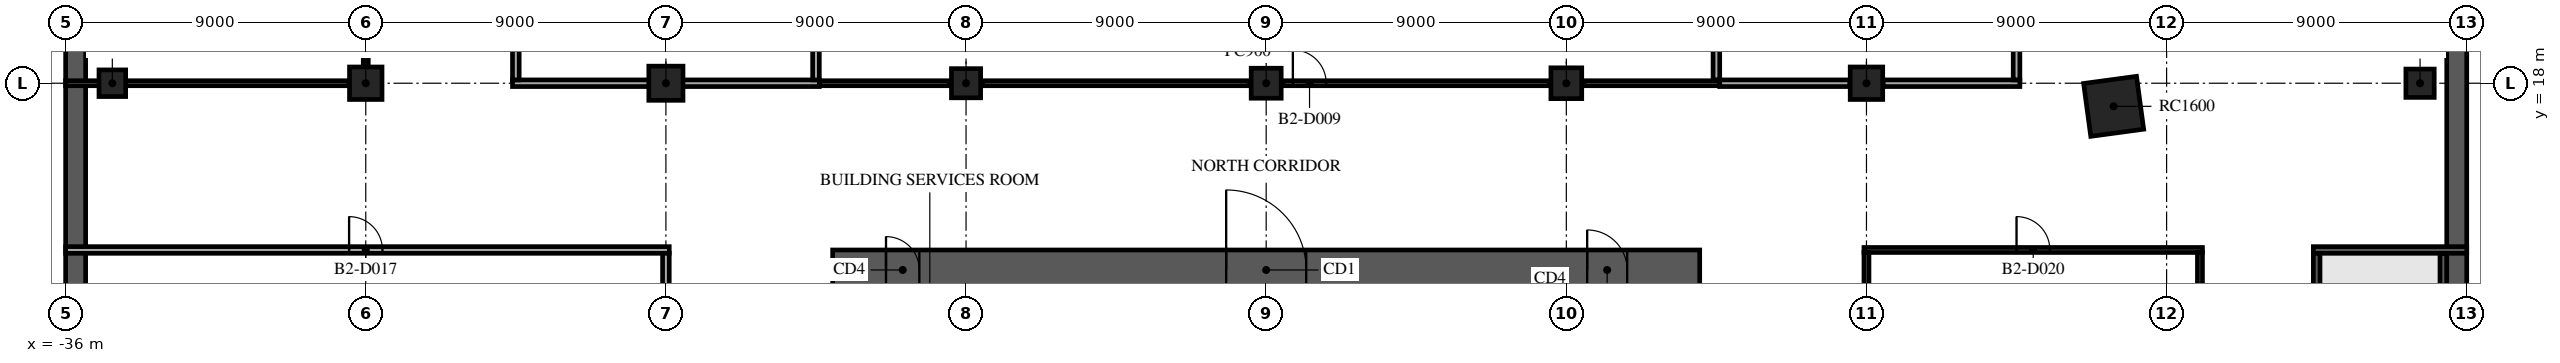
"""IFC4 building model, lengths in metres.
Left out: names, types, materials, properties, quantities, classifications, styles, units other than length and angle.
Written with IfcOpenShell. Run it as: python <this file> out.ifc"""

import sys

from ifc_helpers import new_model, si_unit, direction, frame, frame_2d, origin, origin_2d, place, context, subcontext, project, spatial, rectangle, extrude, element, fill, save


model = new_model("IFC4")
c1 = context("Model", 3, precision=1e-05, world=origin(), true_north=direction((0.0, 1.0)))
c2 = subcontext(c1, "Body", "Model", "MODEL_VIEW")
j1 = project(units=[si_unit("LENGTHUNIT", "METRE"), si_unit("PLANEANGLEUNIT", "RADIAN")], contexts=[c1])
p1 = place(None, origin())
s1 = spatial("IfcSite", under=j1, at=p1, CompositionType="ELEMENT")
p2 = place(p1, origin())
s2 = spatial("IfcBuilding", under=s1, at=p2, CompositionType="ELEMENT")
p3 = place(p2, frame((0.0, 0.0, -9.0)))
s3 = spatial("IfcBuildingStorey", under=s2, at=p3, CompositionType="ELEMENT", Elevation=-9.0)
for number, where, z_axis, x_axis in (
    (1, (35.7, -31.0, -0.3), (0.0, 0.0, 1.0), (0.0, 1.0, 0.0)),
    (2, (-35.7, 31.0, -0.3), (0.0, 0.0, 1.0), (0.0, -1.0, 0.0)),
):
    element("IfcWall", number, at=place(p3, frame(where, z_axis=z_axis, x_axis=x_axis)), inside=s3, PredefinedType="SOLIDWALL", context=c2, shape_type="SweptSolid", body=[
        extrude(rectangle(XDim=62.0, YDim=0.6, at=frame_2d((31.0, 0.0))), origin(), (0.0, 0.0, 1.0), 4.5),
    ])
p4 = place(p3, frame((-34.6, 18.0, -0.3), z_axis=(0.0, 0.0, 1.0), x_axis=(1.0, 0.0, 0.0)))
e3 = element("IfcColumn", 3, at=p4, inside=s3, PredefinedType="COLUMN", context=c2, shape_type="SweptSolid", body=[
    extrude(rectangle(XDim=0.8, YDim=0.8, at=origin_2d()), origin(), (0.0, 0.0, 1.0), 4.8),
])
p5 = place(p3, frame((-27.0, 18.0, -0.3), z_axis=(0.0, 0.0, 1.0), x_axis=(1.0, 0.0, 0.0)))
e4 = element("IfcColumn", 4, at=p5, inside=s3, PredefinedType="COLUMN", context=c2, shape_type="SweptSolid", body=[
    extrude(rectangle(XDim=0.975, YDim=0.975, at=origin_2d()), origin(), (0.0, 0.0, 1.0), 4.8),
])
p6 = place(p3, frame((-18.0, 18.0, -0.3), z_axis=(0.0, 0.0, 1.0), x_axis=(1.0, 0.0, 0.0)))
e5 = element("IfcColumn", 5, at=p6, inside=s3, PredefinedType="COLUMN", context=c2, shape_type="SweptSolid", body=[
    extrude(rectangle(XDim=1.025, YDim=1.025, at=origin_2d()), origin(), (0.0, 0.0, 1.0), 4.8),
])
p7 = place(p3, frame((-9.0, 18.0, -0.3), z_axis=(0.0, 0.0, 1.0), x_axis=(1.0, 0.0, 0.0)))
e6 = element("IfcColumn", 6, at=p7, inside=s3, PredefinedType="COLUMN", context=c2, shape_type="SweptSolid", body=[
    extrude(rectangle(XDim=0.875, YDim=0.875, at=origin_2d()), origin(), (0.0, 0.0, 1.0), 4.8),
])
p8 = place(p3, frame((0.0, 18.0, -0.3), z_axis=(0.0, 0.0, 1.0), x_axis=(1.0, 0.0, 0.0)))
e7 = element("IfcColumn", 7, at=p8, inside=s3, PredefinedType="COLUMN", context=c2, shape_type="SweptSolid", body=[
    extrude(rectangle(XDim=0.9, YDim=0.9, at=origin_2d()), origin(), (0.0, 0.0, 1.0), 4.8),
])
p9 = place(p3, frame((9.0, 18.0, -0.3), z_axis=(0.0, 0.0, 1.0), x_axis=(1.0, 0.0, 0.0)))
e8 = element("IfcColumn", 8, at=p9, inside=s3, PredefinedType="COLUMN", context=c2, shape_type="SweptSolid", body=[
    extrude(rectangle(XDim=0.925, YDim=0.925, at=origin_2d()), origin(), (0.0, 0.0, 1.0), 4.8),
])
p10 = place(p3, frame((18.0, 18.0, -0.3), z_axis=(0.0, 0.0, 1.0), x_axis=(1.0, 0.0, 0.0)))
e9 = element("IfcColumn", 9, at=p10, inside=s3, PredefinedType="COLUMN", context=c2, shape_type="SweptSolid", body=[
    extrude(rectangle(XDim=0.975, YDim=0.975, at=origin_2d()), origin(), (0.0, 0.0, 1.0), 4.8),
])
p11 = place(p3, frame((34.6, 18.0, -0.3), z_axis=(0.0, 0.0, 1.0), x_axis=(1.0, 0.0, 0.0)))
e10 = element("IfcColumn", 10, at=p11, inside=s3, PredefinedType="COLUMN", context=c2, shape_type="SweptSolid", body=[
    extrude(rectangle(XDim=0.85, YDim=0.85, at=origin_2d()), origin(), (0.0, 0.0, 1.0), 4.8),
])
p12 = place(p3, frame((25.412, 17.307, -0.3), z_axis=(0.0, 0.0, 1.0), x_axis=(0.991001197216, 0.133853005627, 0.0)))
e11 = element("IfcColumn", 11, at=p12, inside=s3, PredefinedType="COLUMN", context=c2, shape_type="SweptSolid", body=[
    extrude(rectangle(XDim=1.6, YDim=1.6, at=origin_2d()), origin(), (0.0, 0.0, 1.0), 4.8),
])
p13 = place(p3, frame((-13.0, 12.4, 0.0), z_axis=(0.0, 0.0, 1.0), x_axis=(1.0, 0.0, 0.0)))
e12 = element("IfcWall", 12, at=p13, inside=s3, PredefinedType="SHEAR", context=c2, shape_type="SweptSolid", body=[
    extrude(rectangle(XDim=26.0, YDim=1.2, at=frame_2d((13.0, 0.0))), origin(), (0.0, 0.0, 1.0), 4.2),
])
p14 = place(p13, frame((11.8, 0.0, 0.0)))
e13 = element("IfcOpeningElement", 13, at=p14, cuts=e12, PredefinedType="OPENING", context=c2, shape_type="SweptSolid", body=[
    extrude(rectangle(XDim=2.4, YDim=2.4, at=frame_2d((1.2, 1.2))), frame((0.0, 0.61, 0.0), z_axis=(0.0, -1.0, 0.0), x_axis=(1.0, 0.0, 0.0)), (0.0, 0.0, 1.0), 1.22),
])
p15 = place(p13, frame((22.625, 0.0, 0.0)))
e14 = element("IfcOpeningElement", 14, at=p15, cuts=e12, PredefinedType="OPENING", context=c2, shape_type="SweptSolid", body=[
    extrude(rectangle(XDim=1.2, YDim=2.1, at=frame_2d((0.6, 1.05))), frame((0.0, 0.61, 0.0), z_axis=(0.0, -1.0, 0.0), x_axis=(1.0, 0.0, 0.0)), (0.0, 0.0, 1.0), 1.22),
])
p16 = place(p13, frame((1.6, 0.0, 0.0)))
e15 = element("IfcOpeningElement", 15, at=p16, cuts=e12, PredefinedType="OPENING", context=c2, shape_type="SweptSolid", body=[
    extrude(rectangle(XDim=1.0, YDim=2.1, at=frame_2d((0.5, 1.05))), frame((0.0, 0.61, 0.0), z_axis=(0.0, -1.0, 0.0), x_axis=(1.0, 0.0, 0.0)), (0.0, 0.0, 1.0), 1.22),
])
p17 = place(p3, frame((-36.0, 13.0, 0.0), z_axis=(0.0, 0.0, 1.0), x_axis=(1.0, 0.0, 0.0)))
e16 = element("IfcWall", 16, at=p17, inside=s3, PredefinedType="PARTITIONING", context=c2, shape_type="SweptSolid", body=[
    extrude(rectangle(XDim=18.1, YDim=0.2, at=frame_2d((9.05, 0.0))), origin(), (0.0, 0.0, 1.0), 4.2),
])
p18 = place(p17, frame((8.5, 0.0, 0.0)))
e17 = element("IfcOpeningElement", 17, at=p18, cuts=e16, PredefinedType="OPENING", context=c2, shape_type="SweptSolid", body=[
    extrude(rectangle(XDim=1.0, YDim=2.1, at=frame_2d((0.5, 1.05))), frame((0.0, 0.11, 0.0), z_axis=(0.0, -1.0, 0.0), x_axis=(1.0, 0.0, 0.0)), (0.0, 0.0, 1.0), 0.22),
])
p19 = place(p3, frame((17.925, 13.0, 0.0), z_axis=(0.0, 0.0, 1.0), x_axis=(1.0, 0.0, 0.0)))
e18 = element("IfcWall", 18, at=p19, inside=s3, PredefinedType="PARTITIONING", context=c2, shape_type="SweptSolid", body=[
    extrude(rectangle(XDim=10.15, YDim=0.15, at=frame_2d((5.075, 0.0))), origin(), (0.0, 0.0, 1.0), 4.2),
])
p20 = place(p19, frame((4.575, 0.0, 0.0)))
e19 = element("IfcOpeningElement", 19, at=p20, cuts=e18, PredefinedType="OPENING", context=c2, shape_type="SweptSolid", body=[
    extrude(rectangle(XDim=1.0, YDim=2.1, at=frame_2d((0.5, 1.05))), frame((0.0, 0.085, 0.0), z_axis=(0.0, -1.0, 0.0), x_axis=(1.0, 0.0, 0.0)), (0.0, 0.0, 1.0), 0.17),
])
p21 = place(p3, frame((31.4, 13.0, 0.0), z_axis=(0.0, 0.0, 1.0), x_axis=(1.0, 0.0, 0.0)))
e20 = element("IfcWall", 20, at=p21, inside=s3, PredefinedType="PARTITIONING", context=c2, shape_type="SweptSolid", body=[
    extrude(rectangle(XDim=4.6, YDim=0.2, at=frame_2d((2.3, 0.0))), origin(), (0.0, 0.0, 1.0), 4.2),
])
p22 = place(p3, frame((-36.0, 18.0, 0.0), z_axis=(0.0, 0.0, 1.0), x_axis=(1.0, 0.0, 0.0)))
e21 = element("IfcWall", 21, at=p22, inside=s3, PredefinedType="PARTITIONING", context=c2, shape_type="SweptSolid", body=[
    extrude(rectangle(XDim=8.5, YDim=0.15, at=frame_2d((4.25, 0.0))), origin(), (0.0, 0.0, 1.0), 4.2),
])
for number, where, z_axis, x_axis in (
    (22, (-22.6, 18.0, 0.0), (0.0, 0.0, 1.0), (1.0, 0.0, 0.0)),
    (23, (-17.5, 18.0, 0.0), (0.0, 0.0, 1.0), (1.0, 0.0, 0.0)),
):
    element("IfcWall", number, at=place(p3, frame(where, z_axis=z_axis, x_axis=x_axis)), inside=s3, PredefinedType="PARTITIONING", context=c2, shape_type="SweptSolid", body=[
        extrude(rectangle(XDim=4.1, YDim=0.2, at=frame_2d((2.05, 0.0))), origin(), (0.0, 0.0, 1.0), 4.2),
    ])
p23 = place(p3, frame((-13.4, 18.0, 0.0), z_axis=(0.0, 0.0, 1.0), x_axis=(1.0, 0.0, 0.0)))
e24 = element("IfcWall", 24, at=p23, inside=s3, PredefinedType="PARTITIONING", context=c2, shape_type="SweptSolid", body=[
    extrude(rectangle(XDim=3.9, YDim=0.15, at=frame_2d((1.95, 0.0))), origin(), (0.0, 0.0, 1.0), 4.2),
])
p24 = place(p3, frame((-8.5, 18.0, 0.0), z_axis=(0.0, 0.0, 1.0), x_axis=(1.0, 0.0, 0.0)))
e25 = element("IfcWall", 25, at=p24, inside=s3, PredefinedType="PARTITIONING", context=c2, shape_type="SweptSolid", body=[
    extrude(rectangle(XDim=8.0, YDim=0.15, at=frame_2d((4.0, 0.0))), origin(), (0.0, 0.0, 1.0), 4.2),
])
p25 = place(p3, frame((0.5, 18.0, 0.0), z_axis=(0.0, 0.0, 1.0), x_axis=(1.0, 0.0, 0.0)))
e26 = element("IfcWall", 26, at=p25, inside=s3, PredefinedType="PARTITIONING", context=c2, shape_type="SweptSolid", body=[
    extrude(rectangle(XDim=8.0, YDim=0.15, at=frame_2d((4.0, 0.0))), origin(), (0.0, 0.0, 1.0), 4.2),
])
p26 = place(p25, frame((0.3, 0.0, 0.0)))
e27 = element("IfcOpeningElement", 27, at=p26, cuts=e26, PredefinedType="OPENING", context=c2, shape_type="SweptSolid", body=[
    extrude(rectangle(XDim=1.0, YDim=2.1, at=frame_2d((0.5, 1.05))), frame((0.0, 0.085, 0.0), z_axis=(0.0, -1.0, 0.0), x_axis=(1.0, 0.0, 0.0)), (0.0, 0.0, 1.0), 0.17),
])
p27 = place(p3, frame((9.5, 18.0, 0.0), z_axis=(0.0, 0.0, 1.0), x_axis=(1.0, 0.0, 0.0)))
e28 = element("IfcWall", 28, at=p27, inside=s3, PredefinedType="PARTITIONING", context=c2, shape_type="SweptSolid", body=[
    extrude(rectangle(XDim=4.1, YDim=0.15, at=frame_2d((2.05, 0.0))), origin(), (0.0, 0.0, 1.0), 4.2),
])
p28 = place(p3, frame((13.6, 18.0, 0.0), z_axis=(0.0, 0.0, 1.0), x_axis=(1.0, 0.0, 0.0)))
e29 = element("IfcWall", 29, at=p28, inside=s3, PredefinedType="PARTITIONING", context=c2, shape_type="SweptSolid", body=[
    extrude(rectangle(XDim=3.9, YDim=0.2, at=frame_2d((1.95, 0.0))), origin(), (0.0, 0.0, 1.0), 4.2),
])
p29 = place(p3, frame((18.5, 18.0, 0.0), z_axis=(0.0, 0.0, 1.0), x_axis=(1.0, 0.0, 0.0)))
e30 = element("IfcWall", 30, at=p29, inside=s3, PredefinedType="PARTITIONING", context=c2, shape_type="SweptSolid", body=[
    extrude(rectangle(XDim=4.1, YDim=0.2, at=frame_2d((2.05, 0.0))), origin(), (0.0, 0.0, 1.0), 4.2),
])
p30 = place(p3, frame((-27.0, 18.5, 0.0), z_axis=(0.0, 0.0, 1.0), x_axis=(0.0, 1.0, 0.0)))
e31 = element("IfcWall", 31, at=p30, inside=s3, PredefinedType="PARTITIONING", context=c2, shape_type="SweptSolid", body=[
    extrude(rectangle(XDim=1.242, YDim=0.15, at=frame_2d((0.621, 0.0))), origin(), (0.0, 0.0, 1.0), 4.2),
])
p31 = place(p3, frame((-22.5, 18.1, 0.0), z_axis=(0.0, 0.0, 1.0), x_axis=(0.0, 1.0, 0.0)))
e32 = element("IfcWall", 32, at=p31, inside=s3, PredefinedType="PARTITIONING", context=c2, shape_type="SweptSolid", body=[
    extrude(rectangle(XDim=13.3, YDim=0.2, at=frame_2d((6.65, 0.0))), origin(), (0.0, 0.0, 1.0), 4.2),
])
p32 = place(p31, frame((6.1, 0.0, 0.0)))
e33 = element("IfcOpeningElement", 33, at=p32, cuts=e32, PredefinedType="OPENING", context=c2, shape_type="SweptSolid", body=[
    extrude(rectangle(XDim=1.0, YDim=2.1, at=frame_2d((0.5, 1.05))), frame((0.0, 0.11, 0.0), z_axis=(0.0, -1.0, 0.0), x_axis=(1.0, 0.0, 0.0)), (0.0, 0.0, 1.0), 0.22),
])
p33 = place(p3, frame((-18.0, 9.5, 0.0), z_axis=(0.0, 0.0, 1.0), x_axis=(0.0, 1.0, 0.0)))
e34 = element("IfcWall", 34, at=p33, inside=s3, PredefinedType="PARTITIONING", context=c2, shape_type="SweptSolid", body=[
    extrude(rectangle(XDim=3.4, YDim=0.2, at=frame_2d((1.7, 0.0))), origin(), (0.0, 0.0, 1.0), 4.2),
])
for number, where, z_axis, x_axis in (
    (35, (-13.5, 18.1, 0.0), (0.0, 0.0, 1.0), (0.0, 1.0, 0.0)),
    (36, (13.5, 18.1, 0.0), (0.0, 0.0, 1.0), (0.0, 1.0, 0.0)),
):
    element("IfcWall", number, at=place(p3, frame(where, z_axis=z_axis, x_axis=x_axis)), inside=s3, PredefinedType="PARTITIONING", context=c2, shape_type="SweptSolid", body=[
        extrude(rectangle(XDim=17.9, YDim=0.2, at=frame_2d((8.95, 0.0))), origin(), (0.0, 0.0, 1.0), 4.2),
    ])
p34 = place(p3, frame((18.0, 9.5, 0.0), z_axis=(0.0, 0.0, 1.0), x_axis=(0.0, 1.0, 0.0)))
e37 = element("IfcWall", 37, at=p34, inside=s3, PredefinedType="PARTITIONING", context=c2, shape_type="SweptSolid", body=[
    extrude(rectangle(XDim=3.425, YDim=0.15, at=frame_2d((1.712, 0.0))), origin(), (0.0, 0.0, 1.0), 4.2),
])
p35 = place(p3, frame((22.5, 18.1, 0.0), z_axis=(0.0, 0.0, 1.0), x_axis=(0.0, 1.0, 0.0)))
e38 = element("IfcWall", 38, at=p35, inside=s3, PredefinedType="PARTITIONING", context=c2, shape_type="SweptSolid", body=[
    extrude(rectangle(XDim=13.3, YDim=0.2, at=frame_2d((6.65, 0.0))), origin(), (0.0, 0.0, 1.0), 4.2),
])
p36 = place(p35, frame((6.1, 0.0, 0.0)))
e39 = element("IfcOpeningElement", 39, at=p36, cuts=e38, PredefinedType="OPENING", context=c2, shape_type="SweptSolid", body=[
    extrude(rectangle(XDim=1.0, YDim=2.1, at=frame_2d((0.5, 1.05))), frame((0.0, 0.11, 0.0), z_axis=(0.0, -1.0, 0.0), x_axis=(1.0, 0.0, 0.0)), (0.0, 0.0, 1.0), 0.22),
])
p37 = place(p3, frame((28.0, 4.1, 0.0), z_axis=(0.0, 0.0, 1.0), x_axis=(0.0, 1.0, 0.0)))
e40 = element("IfcWall", 40, at=p37, inside=s3, PredefinedType="PARTITIONING", context=c2, shape_type="SweptSolid", body=[
    extrude(rectangle(XDim=8.825, YDim=0.15, at=frame_2d((4.413, 0.0))), origin(), (0.0, 0.0, 1.0), 4.2),
])
p38 = place(p3, frame((31.5, 4.1, 0.0), z_axis=(0.0, 0.0, 1.0), x_axis=(0.0, 1.0, 0.0)))
e41 = element("IfcWall", 41, at=p38, inside=s3, PredefinedType="PARTITIONING", context=c2, shape_type="SweptSolid", body=[
    extrude(rectangle(XDim=8.8, YDim=0.2, at=frame_2d((4.4, 0.0))), origin(), (0.0, 0.0, 1.0), 4.2),
])
p39 = place(p38, frame((0.7, 0.0, 0.0)))
e42 = element("IfcOpeningElement", 42, at=p39, cuts=e41, PredefinedType="OPENING", context=c2, shape_type="SweptSolid", body=[
    extrude(rectangle(XDim=1.2, YDim=2.1, at=frame_2d((0.6, 1.05))), frame((0.0, 0.11, 0.0), z_axis=(0.0, -1.0, 0.0), x_axis=(1.0, 0.0, 0.0)), (0.0, 0.0, 1.0), 0.22),
])
p40 = place(p3, frame((35.298, 9.581, 0.0), z_axis=(0.0, 0.0, 1.0), x_axis=(0.0, 1.0, 0.0)))
e43 = element("IfcWall", 43, at=p40, inside=s3, PredefinedType="PARTITIONING", context=c2, shape_type="SweptSolid", body=[
    extrude(rectangle(XDim=3.309, YDim=0.2, at=frame_2d((1.655, 0.0))), origin(), (0.0, 0.0, 1.0), 4.2),
])
p41 = place(p14, origin())
e44 = element("IfcDoor", 44, at=p41, inside=s3, OperationType="SINGLE_SWING_LEFT", PredefinedType="DOOR", context=c2, shape_type="SweptSolid", body=[
    extrude(rectangle(XDim=2.4, YDim=2.4, at=frame_2d((1.2, 1.2))), frame((0.0, 0.025, 0.0), z_axis=(0.0, -1.0, 0.0), x_axis=(1.0, 0.0, 0.0)), (0.0, 0.0, 1.0), 0.05),
])
fill(e13, e44)
p42 = place(p15, origin())
e45 = element("IfcDoor", 45, at=p42, inside=s3, OperationType="SINGLE_SWING_LEFT", PredefinedType="DOOR", context=c2, shape_type="SweptSolid", body=[
    extrude(rectangle(XDim=1.2, YDim=2.1, at=frame_2d((0.6, 1.05))), frame((0.0, 0.025, 0.0), z_axis=(0.0, -1.0, 0.0), x_axis=(1.0, 0.0, 0.0)), (0.0, 0.0, 1.0), 0.05),
])
fill(e14, e45)
p43 = place(p16, origin())
e46 = element("IfcDoor", 46, at=p43, inside=s3, OperationType="SINGLE_SWING_LEFT", PredefinedType="DOOR", context=c2, shape_type="SweptSolid", body=[
    extrude(rectangle(XDim=1.0, YDim=2.1, at=frame_2d((0.5, 1.05))), frame((0.0, 0.025, 0.0), z_axis=(0.0, -1.0, 0.0), x_axis=(1.0, 0.0, 0.0)), (0.0, 0.0, 1.0), 0.05),
])
fill(e15, e46)
p44 = place(p26, origin())
e47 = element("IfcDoor", 47, at=p44, inside=s3, OperationType="SINGLE_SWING_LEFT", PredefinedType="DOOR", context=c2, shape_type="SweptSolid", body=[
    extrude(rectangle(XDim=1.0, YDim=2.1, at=frame_2d((0.5, 1.05))), frame((0.0, 0.025, 0.0), z_axis=(0.0, -1.0, 0.0), x_axis=(1.0, 0.0, 0.0)), (0.0, 0.0, 1.0), 0.05),
])
fill(e27, e47)
p45 = place(p18, origin())
e48 = element("IfcDoor", 48, at=p45, inside=s3, OperationType="SINGLE_SWING_LEFT", PredefinedType="DOOR", context=c2, shape_type="SweptSolid", body=[
    extrude(rectangle(XDim=1.0, YDim=2.1, at=frame_2d((0.5, 1.05))), frame((0.0, 0.025, 0.0), z_axis=(0.0, -1.0, 0.0), x_axis=(1.0, 0.0, 0.0)), (0.0, 0.0, 1.0), 0.05),
])
fill(e17, e48)
p46 = place(p20, origin())
e49 = element("IfcDoor", 49, at=p46, inside=s3, OperationType="SINGLE_SWING_RIGHT", PredefinedType="DOOR", context=c2, shape_type="SweptSolid", body=[
    extrude(rectangle(XDim=1.0, YDim=2.1, at=frame_2d((0.5, 1.05))), frame((0.0, 0.025, 0.0), z_axis=(0.0, -1.0, 0.0), x_axis=(1.0, 0.0, 0.0)), (0.0, 0.0, 1.0), 0.05),
])
fill(e19, e49)
save(model, sys.argv[1])
